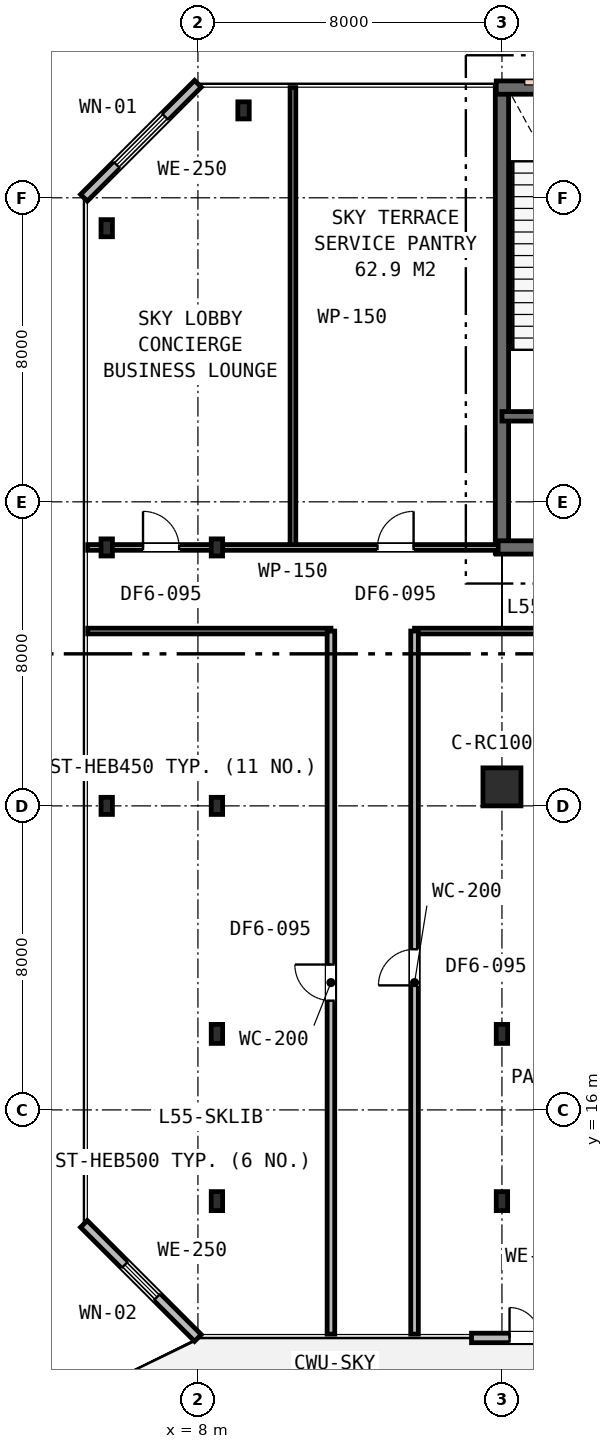
"""IFC4 building model, lengths in metres.
Left out: names, types, materials, properties, quantities, classifications, styles, units other than length and angle.
Written with IfcOpenShell. Run it as: python <this file> out.ifc"""

import sys

from ifc_helpers import new_model, si_unit, direction, frame, frame_2d, origin, origin_2d, place, context, subcontext, project, spatial, rectangle, i_section, extrude, element, fill, save


model = new_model("IFC4")
c1 = context("Model", 3, precision=1e-05, world=origin(), true_north=direction((0.0, 1.0)))
c2 = subcontext(c1, "Body", "Model", "MODEL_VIEW")
j1 = project(units=[si_unit("LENGTHUNIT", "METRE"), si_unit("PLANEANGLEUNIT", "RADIAN")], contexts=[c1])
p1 = place(None, origin())
s1 = spatial("IfcSite", under=j1, at=p1, CompositionType="ELEMENT")
p2 = place(p1, origin())
s2 = spatial("IfcBuilding", under=s1, at=p2, CompositionType="ELEMENT")
p3 = place(p2, frame((0.0, 0.0, 213.0)))
s3 = spatial("IfcBuildingStorey", under=s2, at=p3, CompositionType="ELEMENT", Elevation=213.0)
p4 = place(p3, frame((16.0, 30.65, 0.0), z_axis=(0.0, 0.0, 1.0), x_axis=(0.0, 1.0, 0.0)))
e1 = element("IfcWall", 1, at=p4, inside=s3, PredefinedType="SHEAR", context=c2, shape_type="SweptSolid", body=[
    extrude(rectangle(XDim=12.3, YDim=0.35, at=frame_2d((6.15, 0.0))), origin(), (0.0, 0.0, 1.0), 5.4),
])
p5 = place(p3, frame((15.85, 42.9, 0.0), z_axis=(0.0, 0.0, 1.0), x_axis=(1.0, 0.0, 0.0)))
e2 = element("IfcWall", 2, at=p5, inside=s3, PredefinedType="SHEAR", context=c2, shape_type="SweptSolid", body=[
    extrude(rectangle(XDim=24.3, YDim=0.35, at=frame_2d((12.15, 0.0))), origin(), (0.0, 0.0, 1.0), 5.4),
])
p6 = place(p5, frame((1.6, 0.0, 0.95)))
e3 = element("IfcOpeningElement", 3, at=p6, cuts=e2, PredefinedType="OPENING", context=c2, shape_type="SweptSolid", body=[
    extrude(rectangle(XDim=1.2, YDim=1.6, at=frame_2d((0.6, 0.8))), frame((0.0, 0.185, 0.0), z_axis=(0.0, -1.0, 0.0), x_axis=(1.0, 0.0, 0.0)), (0.0, 0.0, 1.0), 0.37),
])
p7 = place(p5, frame((16.5, 0.0, 0.95)))
e4 = element("IfcOpeningElement", 4, at=p7, cuts=e2, PredefinedType="OPENING", context=c2, shape_type="SweptSolid", body=[
    extrude(rectangle(XDim=1.2, YDim=1.6, at=frame_2d((0.6, 0.8))), frame((0.0, 0.185, 0.0), z_axis=(0.0, -1.0, 0.0), x_axis=(1.0, 0.0, 0.0)), (0.0, 0.0, 1.0), 0.37),
])
p8 = place(p5, frame((21.6, 0.0, 0.95)))
e5 = element("IfcOpeningElement", 5, at=p8, cuts=e2, PredefinedType="OPENING", context=c2, shape_type="SweptSolid", body=[
    extrude(rectangle(XDim=1.2, YDim=1.6, at=frame_2d((0.6, 0.8))), frame((0.0, 0.185, 0.0), z_axis=(0.0, -1.0, 0.0), x_axis=(1.0, 0.0, 0.0)), (0.0, 0.0, 1.0), 0.37),
])
p9 = place(p3, frame((15.85, 30.8, 0.0), z_axis=(0.0, 0.0, 1.0), x_axis=(1.0, 0.0, 0.0)))
e6 = element("IfcWall", 6, at=p9, inside=s3, PredefinedType="SHEAR", context=c2, shape_type="SweptSolid", body=[
    extrude(rectangle(XDim=11.2, YDim=0.35, at=frame_2d((5.6, 0.0))), origin(), (0.0, 0.0, 1.0), 5.4),
])
p10 = place(p9, frame((2.45, 0.0, 0.0)))
e7 = element("IfcOpeningElement", 7, at=p10, cuts=e6, PredefinedType="OPENING", context=c2, shape_type="SweptSolid", body=[
    extrude(rectangle(XDim=1.1, YDim=2.15, at=frame_2d((0.55, 1.075))), frame((0.0, 0.185, 0.0), z_axis=(0.0, -1.0, 0.0), x_axis=(1.0, 0.0, 0.0)), (0.0, 0.0, 1.0), 0.37),
])
p11 = place(p3, frame((16.0, 34.25, 0.0), z_axis=(0.0, 0.0, 1.0), x_axis=(1.0, 0.0, 0.0)))
e8 = element("IfcWall", 8, at=p11, inside=s3, PredefinedType="SHEAR", context=c2, shape_type="SweptSolid", body=[
    extrude(rectangle(XDim=6.05, YDim=0.25, at=frame_2d((3.025, 0.0))), origin(), (0.0, 0.0, 1.0), 5.4),
])
p12 = place(p11, frame((1.25, 0.0, 0.0)))
e9 = element("IfcOpeningElement", 9, at=p12, cuts=e8, PredefinedType="OPENING", context=c2, shape_type="SweptSolid", body=[
    extrude(rectangle(XDim=1.0, YDim=2.15, at=frame_2d((0.5, 1.075))), frame((0.0, 0.135, 0.0), z_axis=(0.0, -1.0, 0.0), x_axis=(1.0, 0.0, 0.0)), (0.0, 0.0, 1.0), 0.27),
])
p13 = place(p11, frame((4.2, 0.0, 0.0)))
e10 = element("IfcOpeningElement", 10, at=p13, cuts=e8, PredefinedType="OPENING", context=c2, shape_type="SweptSolid", body=[
    extrude(rectangle(XDim=1.1, YDim=2.15, at=frame_2d((0.55, 1.075))), frame((0.0, 0.135, 0.0), z_axis=(0.0, -1.0, 0.0), x_axis=(1.0, 0.0, 0.0)), (0.0, 0.0, 1.0), 0.27),
])
p14 = place(p3, frame((8.5, 24.0, 0.0), z_axis=(0.0, 0.0, 1.0), x_axis=(1.0, 0.0, 0.0)))
e11 = element("IfcColumn", 11, at=p14, inside=s3, PredefinedType="COLUMN", context=c2, shape_type="SweptSolid", body=[
    extrude(i_section(OverallWidth=0.3, OverallDepth=0.45, WebThickness=0.014, FlangeThickness=0.026, FilletRadius=0.027, at=origin_2d()), origin(), (0.0, 0.0, 1.0), 5.4),
])
p15 = place(p3, frame((16.0, 24.5, 0.0), z_axis=(0.0, 0.0, 1.0), x_axis=(1.0, 0.0, 0.0)))
e12 = element("IfcColumn", 12, at=p15, inside=s3, PredefinedType="COLUMN", context=c2, shape_type="SweptSolid", body=[
    extrude(rectangle(XDim=1.0, YDim=1.0, at=origin_2d()), origin(), (0.0, 0.0, 1.0), 5.4),
])
for number, where, z_axis, x_axis in (
    (13, (5.6, 24.0, 0.0), (0.0, 0.0, 1.0), (1.0, 0.0, 0.0)),
    (14, (5.6, 30.8, 0.0), (0.0, 0.0, 1.0), (1.0, 0.0, 0.0)),
    (15, (5.6, 39.2, 0.0), (0.0, 0.0, 1.0), (1.0, 0.0, 0.0)),
    (16, (8.5, 30.8, 0.0), (0.0, 0.0, 1.0), (1.0, 0.0, 0.0)),
    (17, (9.2, 42.3, 0.0), (0.0, 0.0, 1.0), (1.0, 0.0, 0.0)),
):
    element("IfcColumn", number, at=place(p3, frame(where, z_axis=z_axis, x_axis=x_axis)), inside=s3, PredefinedType="COLUMN", context=c2, shape_type="SweptSolid", body=[
        extrude(i_section(OverallWidth=0.3, OverallDepth=0.45, WebThickness=0.014, FlangeThickness=0.026, FilletRadius=0.027, at=origin_2d()), origin(), (0.0, 0.0, 1.0), 5.4),
    ])
for number, where, z_axis, x_axis in (
    (18, (8.5, 13.6, 0.0), (0.0, 0.0, 1.0), (1.0, 0.0, 0.0)),
    (19, (16.0, 13.6, 0.0), (0.0, 0.0, 1.0), (1.0, 0.0, 0.0)),
    (20, (8.5, 18.0, 0.0), (0.0, 0.0, 1.0), (1.0, 0.0, 0.0)),
    (21, (16.0, 18.0, 0.0), (0.0, 0.0, 1.0), (1.0, 0.0, 0.0)),
):
    element("IfcColumn", number, at=place(p3, frame(where, z_axis=z_axis, x_axis=x_axis)), inside=s3, PredefinedType="COLUMN", context=c2, shape_type="SweptSolid", body=[
        extrude(i_section(OverallWidth=0.3, OverallDepth=0.5, WebThickness=0.015, FlangeThickness=0.028, FilletRadius=0.027, at=origin_2d()), origin(), (0.0, 0.0, 1.0), 5.4),
    ])
p16 = place(p3, frame((15.2, 10.0, 0.0), z_axis=(0.0, 0.0, 1.0), x_axis=(1.0, 0.0, 0.0)))
e22 = element("IfcWall", 22, at=p16, inside=s3, PredefinedType="STANDARD", context=c2, shape_type="SweptSolid", body=[
    extrude(rectangle(XDim=3.6, YDim=0.25, at=frame_2d((1.8, 0.0))), origin(), (0.0, 0.0, 1.0), 5.13),
])
p17 = place(p16, frame((1.0, 0.0, 0.0)))
e23 = element("IfcOpeningElement", 23, at=p17, cuts=e22, PredefinedType="OPENING", context=c2, shape_type="SweptSolid", body=[
    extrude(rectangle(XDim=1.6, YDim=2.2, at=frame_2d((0.8, 1.1))), frame((0.0, 0.135, 0.0), z_axis=(0.0, -1.0, 0.0), x_axis=(1.0, 0.0, 0.0)), (0.0, 0.0, 1.0), 0.27),
])
p18 = place(p3, frame((8.0, 43.0, 0.0), z_axis=(0.0, 0.0, 1.0), x_axis=(-0.707106781187, -0.707106781187, 0.0)))
e24 = element("IfcWall", 24, at=p18, inside=s3, PredefinedType="STANDARD", context=c2, shape_type="SweptSolid", body=[
    extrude(rectangle(XDim=4.243, YDim=0.25, at=frame_2d((2.121, 0.0))), origin(), (0.0, 0.0, 1.0), 5.13),
])
p19 = place(p18, frame((1.221, 0.0, 0.75)))
e25 = element("IfcOpeningElement", 25, at=p19, cuts=e24, PredefinedType="OPENING", context=c2, shape_type="SweptSolid", body=[
    extrude(rectangle(XDim=1.8, YDim=1.85, at=frame_2d((0.9, 0.925))), frame((0.0, 0.135, 0.0), z_axis=(0.0, -1.0, 0.0), x_axis=(1.0, 0.0, 0.0)), (0.0, 0.0, 1.0), 0.27),
])
p20 = place(p3, frame((5.0, 13.0, 0.0), z_axis=(0.0, 0.0, 1.0), x_axis=(0.707106781187, -0.707106781187, 0.0)))
e26 = element("IfcWall", 26, at=p20, inside=s3, PredefinedType="STANDARD", context=c2, shape_type="SweptSolid", body=[
    extrude(rectangle(XDim=4.243, YDim=0.25, at=frame_2d((2.121, 0.0))), origin(), (0.0, 0.0, 1.0), 5.13),
])
p21 = place(p20, frame((1.521, 0.0, 0.85)))
e27 = element("IfcOpeningElement", 27, at=p21, cuts=e26, PredefinedType="OPENING", context=c2, shape_type="SweptSolid", body=[
    extrude(rectangle(XDim=1.2, YDim=1.6, at=frame_2d((0.6, 0.8))), frame((0.0, 0.135, 0.0), z_axis=(0.0, -1.0, 0.0), x_axis=(1.0, 0.0, 0.0)), (0.0, 0.0, 1.0), 0.27),
])
p22 = place(p3, frame((13.7, 28.6, 0.0), z_axis=(0.0, 0.0, 1.0), x_axis=(1.0, 0.0, 0.0)))
e28 = element("IfcWall", 28, at=p22, inside=s3, PredefinedType="PARTITIONING", context=c2, shape_type="SweptSolid", body=[
    extrude(rectangle(XDim=32.2, YDim=0.15, at=frame_2d((16.1, 0.0))), origin(), (0.0, 0.0, 1.0), 4.52),
])
p23 = place(p22, frame((15.4, 0.0, 0.0)))
e29 = element("IfcOpeningElement", 29, at=p23, cuts=e28, PredefinedType="OPENING", context=c2, shape_type="SweptSolid", body=[
    extrude(rectangle(XDim=1.8, YDim=2.15, at=frame_2d((0.9, 1.075))), frame((0.0, 0.085, 0.0), z_axis=(0.0, -1.0, 0.0), x_axis=(1.0, 0.0, 0.0)), (0.0, 0.0, 1.0), 0.17),
])
p24 = place(p22, frame((26.3, 0.0, 0.0)))
e30 = element("IfcOpeningElement", 30, at=p24, cuts=e28, PredefinedType="OPENING", context=c2, shape_type="SweptSolid", body=[
    extrude(rectangle(XDim=1.8, YDim=2.15, at=frame_2d((0.9, 1.075))), frame((0.0, 0.085, 0.0), z_axis=(0.0, -1.0, 0.0), x_axis=(1.0, 0.0, 0.0)), (0.0, 0.0, 1.0), 0.17),
])
p25 = place(p3, frame((10.5, 30.8, 0.0), z_axis=(0.0, 0.0, 1.0), x_axis=(0.0, 1.0, 0.0)))
e31 = element("IfcWall", 31, at=p25, inside=s3, PredefinedType="PARTITIONING", context=c2, shape_type="SweptSolid", body=[
    extrude(rectangle(XDim=12.1, YDim=0.15, at=frame_2d((6.05, 0.0))), origin(), (0.0, 0.0, 1.0), 4.52),
])
p26 = place(p3, frame((5.1, 30.8, 0.0), z_axis=(0.0, 0.0, 1.0), x_axis=(1.0, 0.0, 0.0)))
e32 = element("IfcWall", 32, at=p26, inside=s3, PredefinedType="PARTITIONING", context=c2, shape_type="SweptSolid", body=[
    extrude(rectangle(XDim=10.8, YDim=0.15, at=frame_2d((5.4, 0.0))), origin(), (0.0, 0.0, 1.0), 4.52),
])
p27 = place(p26, frame((1.455, 0.0, 0.0)))
e33 = element("IfcOpeningElement", 33, at=p27, cuts=e32, PredefinedType="OPENING", context=c2, shape_type="SweptSolid", body=[
    extrude(rectangle(XDim=0.95, YDim=2.15, at=frame_2d((0.475, 1.075))), frame((0.0, 0.085, 0.0), z_axis=(0.0, -1.0, 0.0), x_axis=(1.0, 0.0, 0.0)), (0.0, 0.0, 1.0), 0.17),
])
p28 = place(p26, frame((7.625, 0.0, 0.0)))
e34 = element("IfcOpeningElement", 34, at=p28, cuts=e32, PredefinedType="OPENING", context=c2, shape_type="SweptSolid", body=[
    extrude(rectangle(XDim=0.95, YDim=2.15, at=frame_2d((0.475, 1.075))), frame((0.0, 0.085, 0.0), z_axis=(0.0, -1.0, 0.0), x_axis=(1.0, 0.0, 0.0)), (0.0, 0.0, 1.0), 0.17),
])
p29 = place(p3, frame((5.1, 28.6, 0.0), z_axis=(0.0, 0.0, 1.0), x_axis=(1.0, 0.0, 0.0)))
e35 = element("IfcWall", 35, at=p29, inside=s3, PredefinedType="PARTITIONING", context=c2, shape_type="SweptSolid", body=[
    extrude(rectangle(XDim=6.4, YDim=0.15, at=frame_2d((3.2, 0.0))), origin(), (0.0, 0.0, 1.0), 4.52),
])
p30 = place(p3, frame((11.5, 10.1, 0.0), z_axis=(0.0, 0.0, 1.0), x_axis=(0.0, 1.0, 0.0)))
e36 = element("IfcWall", 36, at=p30, inside=s3, PredefinedType="PARTITIONING", context=c2, shape_type="SweptSolid", body=[
    extrude(rectangle(XDim=18.5, YDim=0.2, at=frame_2d((9.25, 0.0))), origin(), (0.0, 0.0, 1.0), 4.52),
])
p31 = place(p30, frame((8.775, 0.0, 0.0)))
e37 = element("IfcOpeningElement", 37, at=p31, cuts=e36, PredefinedType="OPENING", context=c2, shape_type="SweptSolid", body=[
    extrude(rectangle(XDim=0.95, YDim=2.15, at=frame_2d((0.475, 1.075))), frame((0.0, 0.11, 0.0), z_axis=(0.0, -1.0, 0.0), x_axis=(1.0, 0.0, 0.0)), (0.0, 0.0, 1.0), 0.22),
])
p32 = place(p3, frame((13.7, 10.1, 0.0), z_axis=(0.0, 0.0, 1.0), x_axis=(0.0, 1.0, 0.0)))
e38 = element("IfcWall", 38, at=p32, inside=s3, PredefinedType="PARTITIONING", context=c2, shape_type="SweptSolid", body=[
    extrude(rectangle(XDim=18.5, YDim=0.2, at=frame_2d((9.25, 0.0))), origin(), (0.0, 0.0, 1.0), 4.52),
])
p33 = place(p32, frame((9.177, 0.0, 0.0)))
e39 = element("IfcOpeningElement", 39, at=p33, cuts=e38, PredefinedType="OPENING", context=c2, shape_type="SweptSolid", body=[
    extrude(rectangle(XDim=0.95, YDim=2.15, at=frame_2d((0.475, 1.075))), frame((0.0, 0.11, 0.0), z_axis=(0.0, -1.0, 0.0), x_axis=(1.0, 0.0, 0.0)), (0.0, 0.0, 1.0), 0.22),
])
p34 = place(p17, origin())
e40 = element("IfcDoor", 40, at=p34, inside=s3, OperationType="DOUBLE_DOOR_SINGLE_SWING", PredefinedType="DOOR", context=c2, shape_type="SweptSolid", body=[
    extrude(rectangle(XDim=1.6, YDim=2.2, at=frame_2d((0.8, 1.1))), frame((0.0, 0.025, 0.0), z_axis=(0.0, -1.0, 0.0), x_axis=(1.0, 0.0, 0.0)), (0.0, 0.0, 1.0), 0.05),
])
fill(e23, e40)
p35 = place(p19, origin())
e41 = element("IfcWindow", 41, at=p35, inside=s3, PartitioningType="SINGLE_PANEL", PredefinedType="WINDOW", context=c2, shape_type="SweptSolid", body=[
    extrude(rectangle(XDim=1.8, YDim=1.85, at=frame_2d((0.9, 0.925))), frame((0.0, 0.03, 0.0), z_axis=(0.0, -1.0, 0.0), x_axis=(1.0, 0.0, 0.0)), (0.0, 0.0, 1.0), 0.06),
])
fill(e25, e41)
p36 = place(p21, origin())
e42 = element("IfcWindow", 42, at=p36, inside=s3, PartitioningType="SINGLE_PANEL", PredefinedType="WINDOW", context=c2, shape_type="SweptSolid", body=[
    extrude(rectangle(XDim=1.2, YDim=1.6, at=frame_2d((0.6, 0.8))), frame((0.0, 0.03, 0.0), z_axis=(0.0, -1.0, 0.0), x_axis=(1.0, 0.0, 0.0)), (0.0, 0.0, 1.0), 0.06),
])
fill(e27, e42)
p37 = place(p27, origin())
e43 = element("IfcDoor", 43, at=p37, inside=s3, OperationType="SINGLE_SWING_LEFT", PredefinedType="DOOR", context=c2, shape_type="SweptSolid", body=[
    extrude(rectangle(XDim=0.95, YDim=2.15, at=frame_2d((0.475, 1.075))), frame((0.0, 0.025, 0.0), z_axis=(0.0, -1.0, 0.0), x_axis=(1.0, 0.0, 0.0)), (0.0, 0.0, 1.0), 0.05),
])
fill(e33, e43)
p38 = place(p28, origin())
e44 = element("IfcDoor", 44, at=p38, inside=s3, OperationType="SINGLE_SWING_RIGHT", PredefinedType="DOOR", context=c2, shape_type="SweptSolid", body=[
    extrude(rectangle(XDim=0.95, YDim=2.15, at=frame_2d((0.475, 1.075))), frame((0.0, 0.025, 0.0), z_axis=(0.0, -1.0, 0.0), x_axis=(1.0, 0.0, 0.0)), (0.0, 0.0, 1.0), 0.05),
])
fill(e34, e44)
p39 = place(p31, origin())
e45 = element("IfcDoor", 45, at=p39, inside=s3, OperationType="SINGLE_SWING_RIGHT", PredefinedType="DOOR", context=c2, shape_type="SweptSolid", body=[
    extrude(rectangle(XDim=0.95, YDim=2.15, at=frame_2d((0.475, 1.075))), frame((0.0, 0.025, 0.0), z_axis=(0.0, -1.0, 0.0), x_axis=(1.0, 0.0, 0.0)), (0.0, 0.0, 1.0), 0.05),
])
fill(e37, e45)
p40 = place(p33, origin())
e46 = element("IfcDoor", 46, at=p40, inside=s3, OperationType="SINGLE_SWING_LEFT", PredefinedType="DOOR", context=c2, shape_type="SweptSolid", body=[
    extrude(rectangle(XDim=0.95, YDim=2.15, at=frame_2d((0.475, 1.075))), frame((0.0, 0.025, 0.0), z_axis=(0.0, -1.0, 0.0), x_axis=(1.0, 0.0, 0.0)), (0.0, 0.0, 1.0), 0.05),
])
fill(e39, e46)
save(model, sys.argv[1])
